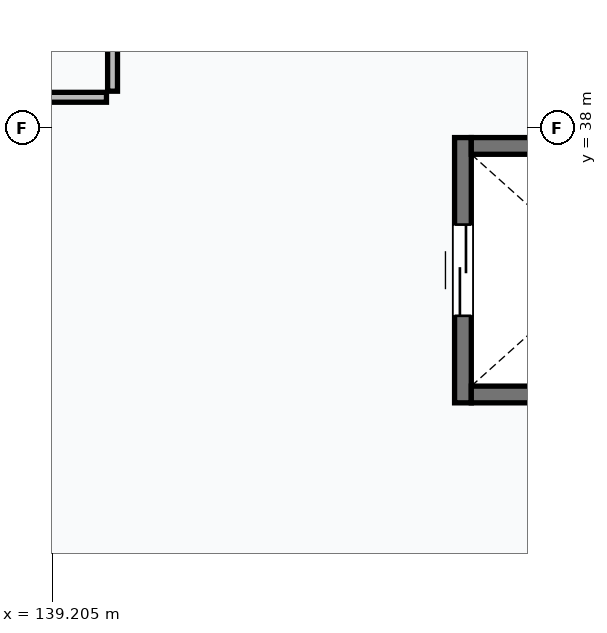
"""IFC4 building model, lengths in metres.
Left out: names, types, materials, properties, quantities, classifications, styles, units other than length and angle.
Written with IfcOpenShell. Run it as: python <this file> out.ifc"""

import sys

from ifc_helpers import new_model, si_unit, direction, frame, frame_2d, origin, place, context, subcontext, project, spatial, rectangle, extrude, element, fill, save


model = new_model("IFC4")
c1 = context("Model", 3, precision=1e-05, world=origin(), true_north=direction((0.0, 1.0)))
c2 = subcontext(c1, "Body", "Model", "MODEL_VIEW")
j1 = project(units=[si_unit("LENGTHUNIT", "METRE"), si_unit("PLANEANGLEUNIT", "RADIAN")], contexts=[c1])
p1 = place(None, origin())
s1 = spatial("IfcSite", under=j1, at=p1, CompositionType="ELEMENT")
p2 = place(p1, origin())
s2 = spatial("IfcBuilding", under=s1, at=p2, CompositionType="ELEMENT")
p3 = place(p2, frame((0.0, 0.0, 15.6)))
s3 = spatial("IfcBuildingStorey", under=s2, at=p3, CompositionType="ELEMENT", Elevation=15.6)
p4 = place(p3, frame((144.61, 34.38, 0.0), z_axis=(0.0, 0.0, 1.0), x_axis=(0.0, 1.0, 0.0)))
e1 = element("IfcWall", 1, at=p4, inside=s3, PredefinedType="SHEAR", context=c2, shape_type="SweptSolid", body=[
    extrude(rectangle(XDim=3.49, YDim=0.22, at=frame_2d((1.745, 0.0))), origin(), (0.0, 0.0, 1.0), 3.6),
])
p5 = place(p4, frame((1.145, 0.0, 0.0)))
e2 = element("IfcOpeningElement", 2, at=p5, cuts=e1, PredefinedType="OPENING", context=c2, shape_type="SweptSolid", body=[
    extrude(rectangle(XDim=1.2, YDim=2.2, at=frame_2d((0.6, 1.1))), frame((0.0, 0.12, 0.0), z_axis=(0.0, -1.0, 0.0), x_axis=(1.0, 0.0, 0.0)), (0.0, 0.0, 1.0), 0.24),
])
for number, where, z_axis, x_axis in (
    (3, (148.12, 34.49, 0.0), (0.0, 0.0, 1.0), (-1.0, 0.0, 0.0)),
    (4, (144.72, 37.76, 0.0), (0.0, 0.0, 1.0), (1.0, 0.0, 0.0)),
):
    element("IfcWall", number, at=place(p3, frame(where, z_axis=z_axis, x_axis=x_axis)), inside=s3, PredefinedType="SHEAR", context=c2, shape_type="SweptSolid", body=[
        extrude(rectangle(XDim=3.4, YDim=0.22, at=frame_2d((1.7, 0.0))), origin(), (0.0, 0.0, 1.0), 3.6),
    ])
p6 = place(p3, frame((132.08, 38.4, 0.0), z_axis=(0.0, 0.0, 1.0), x_axis=(1.0, 0.0, 0.0)))
e5 = element("IfcWall", 5, at=p6, inside=s3, PredefinedType="PARTITIONING", context=c2, shape_type="SweptSolid", body=[
    extrude(rectangle(XDim=7.84, YDim=0.13, at=frame_2d((3.92, 0.0))), origin(), (0.0, 0.0, 1.0), 3.345),
])
p7 = place(p3, frame((140.0, 38.48, 0.0), z_axis=(0.0, 0.0, 1.0), x_axis=(0.0, 1.0, 0.0)))
e6 = element("IfcWall", 6, at=p7, inside=s3, PredefinedType="PARTITIONING", context=c2, shape_type="SweptSolid", body=[
    extrude(rectangle(XDim=13.44, YDim=0.13, at=frame_2d((6.72, 0.0))), origin(), (0.0, 0.0, 1.0), 2.495),
])
p8 = place(p5, origin())
e7 = element("IfcDoor", 7, at=p8, inside=s3, OperationType="DOUBLE_DOOR_SLIDING", PredefinedType="DOOR", context=c2, shape_type="SweptSolid", body=[
    extrude(rectangle(XDim=1.2, YDim=2.2, at=frame_2d((0.6, 1.1))), frame((0.0, 0.025, 0.0), z_axis=(0.0, -1.0, 0.0), x_axis=(1.0, 0.0, 0.0)), (0.0, 0.0, 1.0), 0.05),
])
fill(e2, e7)
save(model, sys.argv[1])
